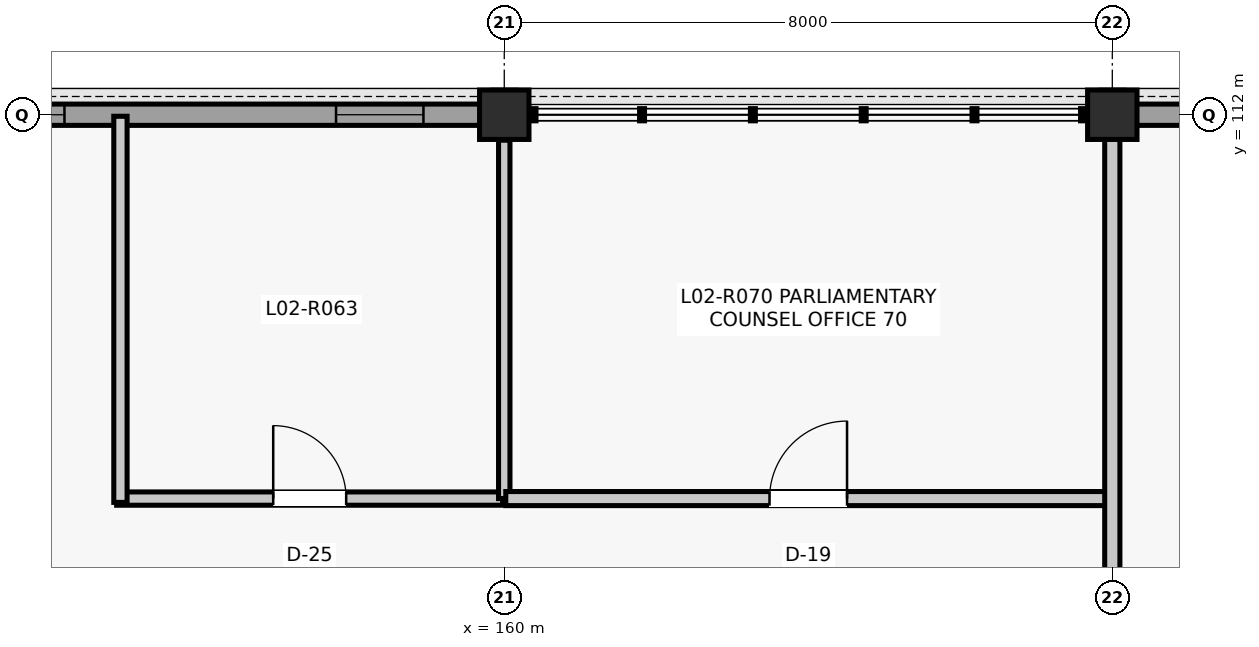
"""IFC4 building model, lengths in metres.
Left out: names, types, materials, properties, quantities, classifications, styles, units other than length and angle.
Written with IfcOpenShell. Run it as: python <this file> out.ifc"""

import sys

from ifc_helpers import new_model, si_unit, direction, frame, frame_2d, origin, origin_2d, place, context, subcontext, project, spatial, rectangle, extrude, element, fill, save


model = new_model("IFC4")
c1 = context("Model", 3, precision=1e-05, world=origin(), true_north=direction((0.0, 1.0)))
c2 = subcontext(c1, "Body", "Model", "MODEL_VIEW")
j1 = project(units=[si_unit("LENGTHUNIT", "METRE"), si_unit("PLANEANGLEUNIT", "RADIAN")], contexts=[c1])
p1 = place(None, origin())
s1 = spatial("IfcSite", under=j1, at=p1, CompositionType="ELEMENT")
p2 = place(p1, origin())
s2 = spatial("IfcBuilding", under=s1, at=p2, CompositionType="ELEMENT")
p3 = place(p2, frame((0.0, 0.0, 9.9)))
s3 = spatial("IfcBuildingStorey", under=s2, at=p3, CompositionType="ELEMENT", Elevation=9.9)
for number, where, z_axis, x_axis in (
    (1, (160.0, 112.0, 0.0), (0.0, 0.0, 1.0), (1.0, 0.0, 0.0)),
    (2, (168.0, 112.0, 0.0), (0.0, 0.0, 1.0), (1.0, 0.0, 0.0)),
):
    element("IfcColumn", number, at=place(p3, frame(where, z_axis=z_axis, x_axis=x_axis)), inside=s3, PredefinedType="COLUMN", context=c2, shape_type="SweptSolid", body=[
        extrude(rectangle(XDim=0.65, YDim=0.65, at=origin_2d()), origin(), (0.0, 0.0, 1.0), 3.96),
    ])
p4 = place(p3, frame((152.31, 112.0, 0.0), z_axis=(0.0, 0.0, 1.0), x_axis=(1.0, 0.0, 0.0)))
e3 = element("IfcWall", 3, at=p4, inside=s3, PredefinedType="SOLIDWALL", context=c2, shape_type="SweptSolid", body=[
    extrude(rectangle(XDim=7.38, YDim=0.28, at=frame_2d((3.69, 0.0))), origin(), (0.0, 0.0, 1.0), 3.347),
])
p5 = place(p4, frame((0.753, 0.0, 0.95)))
e4 = element("IfcOpeningElement", 4, at=p5, cuts=e3, PredefinedType="OPENING", context=c2, shape_type="SweptSolid", body=[
    extrude(rectangle(XDim=1.15, YDim=1.65, at=frame_2d((0.575, 0.825))), frame((0.0, 0.15, 0.0), z_axis=(0.0, -1.0, 0.0), x_axis=(1.0, 0.0, 0.0)), (0.0, 0.0, 1.0), 0.3),
])
p6 = place(p4, frame((5.477, 0.0, 0.95)))
e5 = element("IfcOpeningElement", 5, at=p6, cuts=e3, PredefinedType="OPENING", context=c2, shape_type="SweptSolid", body=[
    extrude(rectangle(XDim=1.15, YDim=1.65, at=frame_2d((0.575, 0.825))), frame((0.0, 0.15, 0.0), z_axis=(0.0, -1.0, 0.0), x_axis=(1.0, 0.0, 0.0)), (0.0, 0.0, 1.0), 0.3),
])
p7 = place(p3, frame((168.31, 112.0, 0.0), z_axis=(0.0, 0.0, 1.0), x_axis=(1.0, 0.0, 0.0)))
e6 = element("IfcWall", 6, at=p7, inside=s3, PredefinedType="SOLIDWALL", context=c2, shape_type="SweptSolid", body=[
    extrude(rectangle(XDim=7.38, YDim=0.28, at=frame_2d((3.69, 0.0))), origin(), (0.0, 0.0, 1.0), 3.344),
])
p8 = place(p7, frame((3.015, 0.0, 0.9)))
e7 = element("IfcOpeningElement", 7, at=p8, cuts=e6, PredefinedType="OPENING", context=c2, shape_type="SweptSolid", body=[
    extrude(rectangle(XDim=1.35, YDim=1.9, at=frame_2d((0.675, 0.95))), frame((0.0, 0.15, 0.0), z_axis=(0.0, -1.0, 0.0), x_axis=(1.0, 0.0, 0.0)), (0.0, 0.0, 1.0), 0.3),
])
p9 = place(p3, frame((154.9, 106.95, 0.0), z_axis=(0.0, 0.0, 1.0), x_axis=(1.0, 0.0, 0.0)))
e8 = element("IfcWall", 8, at=p9, inside=s3, PredefinedType="PARTITIONING", context=c2, shape_type="SweptSolid", body=[
    extrude(rectangle(XDim=5.08, YDim=0.175, at=frame_2d((2.54, 0.0))), origin(), (0.0, 0.0, 1.0), 3.227),
])
p10 = place(p9, frame((2.06, 0.0, 0.0)))
e9 = element("IfcOpeningElement", 9, at=p10, cuts=e8, PredefinedType="OPENING", context=c2, shape_type="SweptSolid", body=[
    extrude(rectangle(XDim=0.96, YDim=2.14, at=frame_2d((0.48, 1.07))), frame((0.0, 0.097, 0.0), z_axis=(0.0, -1.0, 0.0), x_axis=(1.0, 0.0, 0.0)), (0.0, 0.0, 1.0), 0.195),
])
p11 = place(p3, frame((154.95, 106.9, 0.0), z_axis=(0.0, 0.0, 1.0), x_axis=(0.0, 1.0, 0.0)))
e10 = element("IfcWall", 10, at=p11, inside=s3, PredefinedType="PARTITIONING", context=c2, shape_type="SweptSolid", body=[
    extrude(rectangle(XDim=5.08, YDim=0.175, at=frame_2d((2.54, 0.0))), origin(), (0.0, 0.0, 1.0), 3.34),
])
p12 = place(p3, frame((160.0, 106.95, 0.0), z_axis=(0.0, 0.0, 1.0), x_axis=(0.0, 1.0, 0.0)))
e11 = element("IfcWall", 11, at=p12, inside=s3, PredefinedType="PARTITIONING", context=c2, shape_type="SweptSolid", body=[
    extrude(rectangle(XDim=4.715, YDim=0.15, at=frame_2d((2.357, 0.0))), origin(), (0.0, 0.0, 1.0), 3.227),
])
p13 = place(p3, frame((160.02, 106.95, 0.0), z_axis=(0.0, 0.0, 1.0), x_axis=(1.0, 0.0, 0.0)))
e12 = element("IfcWall", 12, at=p13, inside=s3, PredefinedType="PARTITIONING", context=c2, shape_type="SweptSolid", body=[
    extrude(rectangle(XDim=7.96, YDim=0.185, at=frame_2d((3.98, 0.0))), origin(), (0.0, 0.0, 1.0), 3.151),
])
p14 = place(p13, frame((3.47, 0.0, 0.0)))
e13 = element("IfcOpeningElement", 13, at=p14, cuts=e12, PredefinedType="OPENING", context=c2, shape_type="SweptSolid", body=[
    extrude(rectangle(XDim=1.02, YDim=2.2, at=frame_2d((0.51, 1.1))), frame((0.0, 0.103, 0.0), z_axis=(0.0, -1.0, 0.0), x_axis=(1.0, 0.0, 0.0)), (0.0, 0.0, 1.0), 0.205),
])
p15 = place(p3, frame((168.0, 104.315, 0.0), z_axis=(0.0, 0.0, 1.0), x_axis=(0.0, 1.0, 0.0)))
e14 = element("IfcWall", 14, at=p15, inside=s3, PredefinedType="PARTITIONING", context=c2, shape_type="SweptSolid", body=[
    extrude(rectangle(XDim=7.37, YDim=0.2, at=frame_2d((3.685, 0.0))), origin(), (0.0, 0.0, 1.0), 3.151),
])
p16 = place(p15, frame((0.52, 0.0, 0.0)))
e15 = element("IfcOpeningElement", 15, at=p16, cuts=e14, PredefinedType="OPENING", context=c2, shape_type="SweptSolid", body=[
    extrude(rectangle(XDim=0.94, YDim=2.12, at=frame_2d((0.47, 1.06))), frame((0.0, 0.11, 0.0), z_axis=(0.0, -1.0, 0.0), x_axis=(1.0, 0.0, 0.0)), (0.0, 0.0, 1.0), 0.22),
])
p17 = place(p5, origin())
e16 = element("IfcWindow", 16, at=p17, inside=s3, PartitioningType="SINGLE_PANEL", PredefinedType="WINDOW", context=c2, shape_type="SweptSolid", body=[
    extrude(rectangle(XDim=1.15, YDim=1.65, at=frame_2d((0.575, 0.825))), frame((0.0, 0.03, 0.0), z_axis=(0.0, -1.0, 0.0), x_axis=(1.0, 0.0, 0.0)), (0.0, 0.0, 1.0), 0.06),
])
fill(e4, e16)
p18 = place(p6, origin())
e17 = element("IfcWindow", 17, at=p18, inside=s3, PartitioningType="SINGLE_PANEL", PredefinedType="WINDOW", context=c2, shape_type="SweptSolid", body=[
    extrude(rectangle(XDim=1.15, YDim=1.65, at=frame_2d((0.575, 0.825))), frame((0.0, 0.03, 0.0), z_axis=(0.0, -1.0, 0.0), x_axis=(1.0, 0.0, 0.0)), (0.0, 0.0, 1.0), 0.06),
])
fill(e5, e17)
p19 = place(p10, origin())
e18 = element("IfcDoor", 18, at=p19, inside=s3, OperationType="SINGLE_SWING_LEFT", PredefinedType="DOOR", context=c2, shape_type="SweptSolid", body=[
    extrude(rectangle(XDim=0.96, YDim=2.14, at=frame_2d((0.48, 1.07))), frame((0.0, 0.025, 0.0), z_axis=(0.0, -1.0, 0.0), x_axis=(1.0, 0.0, 0.0)), (0.0, 0.0, 1.0), 0.05),
])
fill(e9, e18)
p20 = place(p14, origin())
e19 = element("IfcDoor", 19, at=p20, inside=s3, OperationType="SINGLE_SWING_RIGHT", PredefinedType="DOOR", context=c2, shape_type="SweptSolid", body=[
    extrude(rectangle(XDim=1.02, YDim=2.2, at=frame_2d((0.51, 1.1))), frame((0.0, 0.025, 0.0), z_axis=(0.0, -1.0, 0.0), x_axis=(1.0, 0.0, 0.0)), (0.0, 0.0, 1.0), 0.05),
])
fill(e13, e19)
save(model, sys.argv[1])
